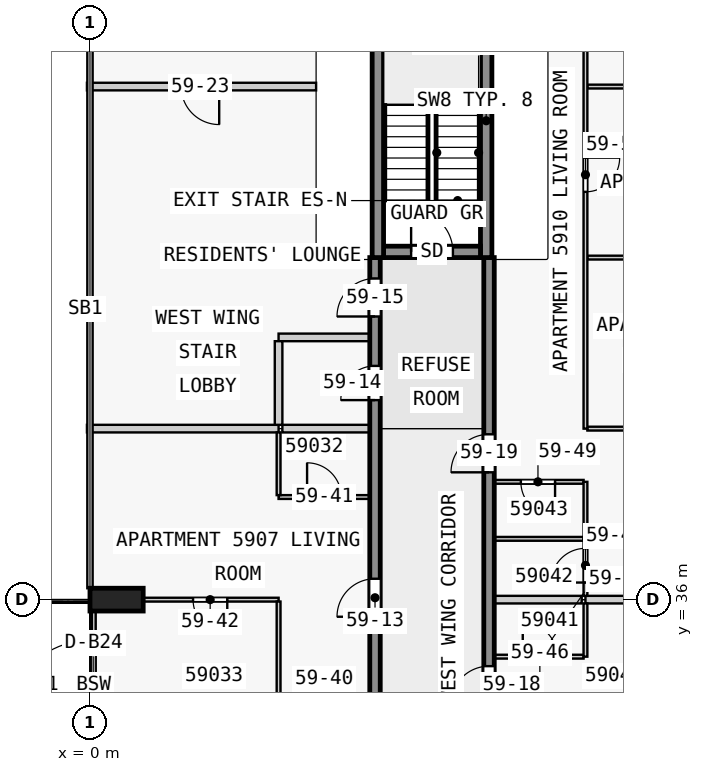
"""IFC4 building model, lengths in metres.
Left out: names, types, materials, properties, quantities, classifications, styles, units other than length and angle.
Written with IfcOpenShell. Run it as: python <this file> out.ifc"""

import sys

from ifc_helpers import new_model, si_unit, direction, frame, frame_2d, origin, origin_2d, place, context, subcontext, project, spatial, rectangle, extrude, element, fill, save


model = new_model("IFC4")
c1 = context("Model", 3, precision=1e-05, world=origin(), true_north=direction((0.0, 1.0)))
c2 = subcontext(c1, "Body", "Model", "MODEL_VIEW")
j1 = project(units=[si_unit("LENGTHUNIT", "METRE"), si_unit("PLANEANGLEUNIT", "RADIAN")], contexts=[c1])
p1 = place(None, origin())
s1 = spatial("IfcSite", under=j1, at=p1, CompositionType="ELEMENT")
p2 = place(p1, origin())
s2 = spatial("IfcBuilding", under=s1, at=p2, CompositionType="ELEMENT")
p3 = place(p2, frame((0.0, 0.0, 225.9)))
s3 = spatial("IfcBuildingStorey", under=s2, at=p3, CompositionType="ELEMENT", Elevation=225.9)
p4 = place(p3, frame((0.7, 36.0, 0.0), z_axis=(0.0, 0.0, 1.0), x_axis=(0.0, 1.0, 0.0)))
e1 = element("IfcColumn", 1, at=p4, inside=s3, PredefinedType="COLUMN", context=c2, shape_type="SweptSolid", body=[
    extrude(rectangle(XDim=0.6, YDim=1.4, at=origin_2d()), origin(), (0.0, 0.0, 1.0), 3.5),
])
p5 = place(p3, frame((7.725, 45.15, 0.0), z_axis=(0.0, 0.0, 1.0), x_axis=(1.0, 0.0, 0.0)))
e2 = element("IfcWall", 2, at=p5, inside=s3, PredefinedType="SHEAR", context=c2, shape_type="SweptSolid", body=[
    extrude(rectangle(XDim=2.55, YDim=0.3, at=frame_2d((1.275, 0.0))), origin(), (0.0, 0.0, 1.0), 3.5),
])
p6 = place(p5, frame((0.725, 0.0, 0.0)))
e3 = element("IfcOpeningElement", 3, at=p6, cuts=e2, PredefinedType="OPENING", context=c2, shape_type="SweptSolid", body=[
    extrude(rectangle(XDim=1.1, YDim=2.1, at=frame_2d((0.55, 1.05))), frame((0.0, 0.16, 0.0), z_axis=(0.0, -1.0, 0.0), x_axis=(1.0, 0.0, 0.0)), (0.0, 0.0, 1.0), 0.32),
])
for number, where, z_axis, x_axis in (
    (4, (7.575, 45.0, 0.0), (0.0, 0.0, 1.0), (0.0, 1.0, 0.0)),
    (5, (10.425, 45.0, 0.0), (0.0, 0.0, 1.0), (0.0, 1.0, 0.0)),
):
    element("IfcWall", number, at=place(p3, frame(where, z_axis=z_axis, x_axis=x_axis)), inside=s3, PredefinedType="SHEAR", context=c2, shape_type="SweptSolid", body=[
        extrude(rectangle(XDim=7.2, YDim=0.3, at=frame_2d((3.6, 0.0))), origin(), (0.0, 0.0, 1.0), 3.5),
    ])
p7 = place(p3, frame((7.5, 18.0, 0.0), z_axis=(0.0, 0.0, 1.0), x_axis=(0.0, 1.0, 0.0)))
e6 = element("IfcWall", 6, at=p7, inside=s3, PredefinedType="SHEAR", context=c2, shape_type="SweptSolid", body=[
    extrude(rectangle(XDim=27.0, YDim=0.275, at=frame_2d((13.5, 0.0))), origin(), (0.0, 0.0, 1.0), 3.05),
])
p8 = place(p7, frame((1.75, 0.0, 0.0)))
e7 = element("IfcOpeningElement", 7, at=p8, cuts=e6, PredefinedType="OPENING", context=c2, shape_type="SweptSolid", body=[
    extrude(rectangle(XDim=1.0, YDim=2.1, at=frame_2d((0.5, 1.05))), frame((0.0, 0.147, 0.0), z_axis=(0.0, -1.0, 0.0), x_axis=(1.0, 0.0, 0.0)), (0.0, 0.0, 1.0), 0.295),
])
p9 = place(p7, frame((8.55, 0.0, 0.0)))
e8 = element("IfcOpeningElement", 8, at=p9, cuts=e6, PredefinedType="OPENING", context=c2, shape_type="SweptSolid", body=[
    extrude(rectangle(XDim=1.0, YDim=2.1, at=frame_2d((0.5, 1.05))), frame((0.0, 0.147, 0.0), z_axis=(0.0, -1.0, 0.0), x_axis=(1.0, 0.0, 0.0)), (0.0, 0.0, 1.0), 0.295),
])
p10 = place(p7, frame((17.55, 0.0, 0.0)))
e9 = element("IfcOpeningElement", 9, at=p10, cuts=e6, PredefinedType="OPENING", context=c2, shape_type="SweptSolid", body=[
    extrude(rectangle(XDim=1.0, YDim=2.1, at=frame_2d((0.5, 1.05))), frame((0.0, 0.147, 0.0), z_axis=(0.0, -1.0, 0.0), x_axis=(1.0, 0.0, 0.0)), (0.0, 0.0, 1.0), 0.295),
])
p11 = place(p7, frame((23.25, 0.0, 0.0)))
e10 = element("IfcOpeningElement", 10, at=p11, cuts=e6, PredefinedType="OPENING", context=c2, shape_type="SweptSolid", body=[
    extrude(rectangle(XDim=0.9, YDim=2.1, at=frame_2d((0.45, 1.05))), frame((0.0, 0.147, 0.0), z_axis=(0.0, -1.0, 0.0), x_axis=(1.0, 0.0, 0.0)), (0.0, 0.0, 1.0), 0.295),
])
p12 = place(p7, frame((25.45, 0.0, 0.0)))
e11 = element("IfcOpeningElement", 11, at=p12, cuts=e6, PredefinedType="OPENING", context=c2, shape_type="SweptSolid", body=[
    extrude(rectangle(XDim=1.0, YDim=2.1, at=frame_2d((0.5, 1.05))), frame((0.0, 0.147, 0.0), z_axis=(0.0, -1.0, 0.0), x_axis=(1.0, 0.0, 0.0)), (0.0, 0.0, 1.0), 0.295),
])
p13 = place(p3, frame((10.5, 18.0, 0.0), z_axis=(0.0, 0.0, 1.0), x_axis=(0.0, 1.0, 0.0)))
e12 = element("IfcWall", 12, at=p13, inside=s3, PredefinedType="SHEAR", context=c2, shape_type="SweptSolid", body=[
    extrude(rectangle(XDim=27.0, YDim=0.275, at=frame_2d((13.5, 0.0))), origin(), (0.0, 0.0, 1.0), 3.05),
])
p14 = place(p13, frame((4.05, 0.0, 0.0)))
e13 = element("IfcOpeningElement", 13, at=p14, cuts=e12, PredefinedType="OPENING", context=c2, shape_type="SweptSolid", body=[
    extrude(rectangle(XDim=1.0, YDim=2.1, at=frame_2d((0.5, 1.05))), frame((0.0, 0.147, 0.0), z_axis=(0.0, -1.0, 0.0), x_axis=(1.0, 0.0, 0.0)), (0.0, 0.0, 1.0), 0.295),
])
p15 = place(p13, frame((10.35, 0.0, 0.0)))
e14 = element("IfcOpeningElement", 14, at=p15, cuts=e12, PredefinedType="OPENING", context=c2, shape_type="SweptSolid", body=[
    extrude(rectangle(XDim=1.8, YDim=2.1, at=frame_2d((0.9, 1.05))), frame((0.0, 0.147, 0.0), z_axis=(0.0, -1.0, 0.0), x_axis=(1.0, 0.0, 0.0)), (0.0, 0.0, 1.0), 0.295),
])
p16 = place(p13, frame((15.25, 0.0, 0.0)))
e15 = element("IfcOpeningElement", 15, at=p16, cuts=e12, PredefinedType="OPENING", context=c2, shape_type="SweptSolid", body=[
    extrude(rectangle(XDim=1.0, YDim=2.1, at=frame_2d((0.5, 1.05))), frame((0.0, 0.147, 0.0), z_axis=(0.0, -1.0, 0.0), x_axis=(1.0, 0.0, 0.0)), (0.0, 0.0, 1.0), 0.295),
])
p17 = place(p13, frame((21.35, 0.0, 0.0)))
e16 = element("IfcOpeningElement", 16, at=p17, cuts=e12, PredefinedType="OPENING", context=c2, shape_type="SweptSolid", body=[
    extrude(rectangle(XDim=1.0, YDim=2.1, at=frame_2d((0.5, 1.05))), frame((0.0, 0.147, 0.0), z_axis=(0.0, -1.0, 0.0), x_axis=(1.0, 0.0, 0.0)), (0.0, 0.0, 1.0), 0.295),
])
p18 = place(p3, frame((0.1, 31.5, 0.0), z_axis=(0.0, 0.0, 1.0), x_axis=(0.0, 1.0, 0.0)))
e17 = element("IfcWall", 17, at=p18, inside=s3, PredefinedType="STANDARD", context=c2, shape_type="SweptSolid", body=[
    extrude(rectangle(XDim=4.5, YDim=0.1, at=frame_2d((2.25, 0.0))), origin(), (0.0, 0.0, 1.0), 3.05),
])
p19 = place(p18, frame((1.05, 0.0, 0.0)))
e18 = element("IfcOpeningElement", 18, at=p19, cuts=e17, PredefinedType="OPENING", context=c2, shape_type="SweptSolid", body=[
    extrude(rectangle(XDim=2.4, YDim=2.4, at=frame_2d((1.2, 1.2))), frame((0.0, 0.06, 0.0), z_axis=(0.0, -1.0, 0.0), x_axis=(1.0, 0.0, 0.0)), (0.0, 0.0, 1.0), 0.12),
])
p20 = place(p3, frame((10.637, 34.5, 0.0), z_axis=(0.0, 0.0, 1.0), x_axis=(1.0, 0.0, 0.0)))
e19 = element("IfcWall", 19, at=p20, inside=s3, PredefinedType="PARTITIONING", context=c2, shape_type="SweptSolid", body=[
    extrude(rectangle(XDim=2.35, YDim=0.1, at=frame_2d((1.175, 0.0))), origin(), (0.0, 0.0, 1.0), 3.05),
])
p21 = place(p20, frame((0.75, 0.0, 0.0)))
e20 = element("IfcOpeningElement", 20, at=p21, cuts=e19, PredefinedType="OPENING", context=c2, shape_type="SweptSolid", body=[
    extrude(rectangle(XDim=0.9, YDim=2.1, at=frame_2d((0.45, 1.05))), frame((0.0, 0.06, 0.0), z_axis=(0.0, -1.0, 0.0), x_axis=(1.0, 0.0, 0.0)), (0.0, 0.0, 1.0), 0.12),
])
p22 = place(p3, frame((4.962, 36.0, 0.0), z_axis=(0.0, 0.0, 1.0), x_axis=(-1.0, 0.0, 0.0)))
e21 = element("IfcWall", 21, at=p22, inside=s3, PredefinedType="PARTITIONING", context=c2, shape_type="SweptSolid", body=[
    extrude(rectangle(XDim=3.562, YDim=0.1, at=frame_2d((1.781, 0.0))), origin(), (0.0, 0.0, 1.0), 3.05),
])
p23 = place(p22, frame((1.35, 0.0, 0.0)))
e22 = element("IfcOpeningElement", 22, at=p23, cuts=e21, PredefinedType="OPENING", context=c2, shape_type="SweptSolid", body=[
    extrude(rectangle(XDim=0.9, YDim=2.1, at=frame_2d((0.45, 1.05))), frame((0.0, 0.06, 0.0), z_axis=(0.0, -1.0, 0.0), x_axis=(1.0, 0.0, 0.0)), (0.0, 0.0, 1.0), 0.12),
])
p24 = place(p3, frame((12.938, 36.0, 0.0), z_axis=(0.0, 0.0, 1.0), x_axis=(-1.0, 0.0, 0.0)))
e23 = element("IfcWall", 23, at=p24, inside=s3, PredefinedType="PARTITIONING", context=c2, shape_type="SweptSolid", body=[
    extrude(rectangle(XDim=2.3, YDim=0.2, at=frame_2d((1.15, 0.0))), origin(), (0.0, 0.0, 1.0), 3.05),
])
p25 = place(p3, frame((13.038, 36.0, 0.0), z_axis=(0.0, 0.0, 1.0), x_axis=(1.0, 0.0, 0.0)))
e24 = element("IfcWall", 24, at=p25, inside=s3, PredefinedType="PARTITIONING", context=c2, shape_type="SweptSolid", body=[
    extrude(rectangle(XDim=3.562, YDim=0.2, at=frame_2d((1.781, 0.0))), origin(), (0.0, 0.0, 1.0), 3.05),
])
p26 = place(p3, frame((12.988, 37.6, 0.0), z_axis=(0.0, 0.0, 1.0), x_axis=(-1.0, 0.0, 0.0)))
e25 = element("IfcWall", 25, at=p26, inside=s3, PredefinedType="PARTITIONING", context=c2, shape_type="SweptSolid", body=[
    extrude(rectangle(XDim=2.35, YDim=0.1, at=frame_2d((1.175, 0.0))), origin(), (0.0, 0.0, 1.0), 3.05),
])
p27 = place(p3, frame((4.962, 38.7, 0.0), z_axis=(0.0, 0.0, 1.0), x_axis=(1.0, 0.0, 0.0)))
e26 = element("IfcWall", 26, at=p27, inside=s3, PredefinedType="PARTITIONING", context=c2, shape_type="SweptSolid", body=[
    extrude(rectangle(XDim=2.4, YDim=0.1, at=frame_2d((1.2, 0.0))), origin(), (0.0, 0.0, 1.0), 3.05),
])
p28 = place(p27, frame((0.75, 0.0, 0.0)))
e27 = element("IfcOpeningElement", 27, at=p28, cuts=e26, PredefinedType="OPENING", context=c2, shape_type="SweptSolid", body=[
    extrude(rectangle(XDim=0.9, YDim=2.1, at=frame_2d((0.45, 1.05))), frame((0.0, 0.06, 0.0), z_axis=(0.0, -1.0, 0.0), x_axis=(1.0, 0.0, 0.0)), (0.0, 0.0, 1.0), 0.12),
])
p29 = place(p3, frame((12.988, 39.1, 0.0), z_axis=(0.0, 0.0, 1.0), x_axis=(-1.0, 0.0, 0.0)))
e28 = element("IfcWall", 28, at=p29, inside=s3, PredefinedType="PARTITIONING", context=c2, shape_type="SweptSolid", body=[
    extrude(rectangle(XDim=2.35, YDim=0.1, at=frame_2d((1.175, 0.0))), origin(), (0.0, 0.0, 1.0), 3.05),
])
p30 = place(p29, frame((0.75, 0.0, 0.0)))
e29 = element("IfcOpeningElement", 29, at=p30, cuts=e28, PredefinedType="OPENING", context=c2, shape_type="SweptSolid", body=[
    extrude(rectangle(XDim=0.9, YDim=2.1, at=frame_2d((0.45, 1.05))), frame((0.0, 0.06, 0.0), z_axis=(0.0, -1.0, 0.0), x_axis=(1.0, 0.0, 0.0)), (0.0, 0.0, 1.0), 0.12),
])
p31 = place(p3, frame((13.087, 40.5, 0.0), z_axis=(0.0, 0.0, 1.0), x_axis=(1.0, 0.0, 0.0)))
e30 = element("IfcWall", 30, at=p31, inside=s3, PredefinedType="PARTITIONING", context=c2, shape_type="SweptSolid", body=[
    extrude(rectangle(XDim=4.763, YDim=0.1, at=frame_2d((2.381, 0.0))), origin(), (0.0, 0.0, 1.0), 3.05),
])
p32 = place(p31, frame((1.95, 0.0, 0.0)))
e31 = element("IfcOpeningElement", 31, at=p32, cuts=e30, PredefinedType="OPENING", context=c2, shape_type="SweptSolid", body=[
    extrude(rectangle(XDim=0.9, YDim=2.1, at=frame_2d((0.45, 1.05))), frame((0.0, 0.06, 0.0), z_axis=(0.0, -1.0, 0.0), x_axis=(1.0, 0.0, 0.0)), (0.0, 0.0, 1.0), 0.12),
])
p33 = place(p3, frame((7.363, 40.5, 0.0), z_axis=(0.0, 0.0, 1.0), x_axis=(-1.0, 0.0, 0.0)))
e32 = element("IfcWall", 32, at=p33, inside=s3, PredefinedType="PARTITIONING", context=c2, shape_type="SweptSolid", body=[
    extrude(rectangle(XDim=2.3, YDim=0.2, at=frame_2d((1.15, 0.0))), origin(), (0.0, 0.0, 1.0), 3.05),
])
p34 = place(p3, frame((-0.08, 40.5, 0.0), z_axis=(0.0, 0.0, 1.0), x_axis=(1.0, 0.0, 0.0)))
e33 = element("IfcWall", 33, at=p34, inside=s3, PredefinedType="PARTITIONING", context=c2, shape_type="SweptSolid", body=[
    extrude(rectangle(XDim=5.042, YDim=0.2, at=frame_2d((2.521, 0.0))), origin(), (0.0, 0.0, 1.0), 3.05),
])
p35 = place(p3, frame((7.363, 42.9, 0.0), z_axis=(0.0, 0.0, 1.0), x_axis=(-1.0, 0.0, 0.0)))
e34 = element("IfcWall", 34, at=p35, inside=s3, PredefinedType="PARTITIONING", context=c2, shape_type="SweptSolid", body=[
    extrude(rectangle(XDim=2.4, YDim=0.2, at=frame_2d((1.2, 0.0))), origin(), (0.0, 0.0, 1.0), 3.05),
])
p36 = place(p3, frame((17.85, 45.0, 0.0), z_axis=(0.0, 0.0, 1.0), x_axis=(-1.0, 0.0, 0.0)))
e35 = element("IfcWall", 35, at=p36, inside=s3, PredefinedType="PARTITIONING", context=c2, shape_type="SweptSolid", body=[
    extrude(rectangle(XDim=4.763, YDim=0.1, at=frame_2d((2.381, 0.0))), origin(), (0.0, 0.0, 1.0), 3.05),
])
p37 = place(p3, frame((18.08, 49.5, 0.0), z_axis=(0.0, 0.0, 1.0), x_axis=(-1.0, 0.0, 0.0)))
e36 = element("IfcWall", 36, at=p37, inside=s3, PredefinedType="PARTITIONING", context=c2, shape_type="SweptSolid", body=[
    extrude(rectangle(XDim=4.993, YDim=0.1, at=frame_2d((2.496, 0.0))), origin(), (0.0, 0.0, 1.0), 3.05),
])
p38 = place(p3, frame((5.95, 49.5, 0.0), z_axis=(0.0, 0.0, 1.0), x_axis=(-1.0, 0.0, 0.0)))
e37 = element("IfcWall", 37, at=p38, inside=s3, PredefinedType="PARTITIONING", context=c2, shape_type="SweptSolid", body=[
    extrude(rectangle(XDim=6.03, YDim=0.2, at=frame_2d((3.015, 0.0))), origin(), (0.0, 0.0, 1.0), 3.05),
])
p39 = place(p38, frame((2.55, 0.0, 0.0)))
e38 = element("IfcOpeningElement", 38, at=p39, cuts=e37, PredefinedType="OPENING", context=c2, shape_type="SweptSolid", body=[
    extrude(rectangle(XDim=1.0, YDim=2.1, at=frame_2d((0.5, 1.05))), frame((0.0, 0.11, 0.0), z_axis=(0.0, -1.0, 0.0), x_axis=(1.0, 0.0, 0.0)), (0.0, 0.0, 1.0), 0.22),
])
p40 = place(p3, frame((4.962, 40.4, 0.0), z_axis=(0.0, 0.0, 1.0), x_axis=(0.0, -1.0, 0.0)))
e39 = element("IfcWall", 39, at=p40, inside=s3, PredefinedType="PARTITIONING", context=c2, shape_type="SweptSolid", body=[
    extrude(rectangle(XDim=1.65, YDim=0.1, at=frame_2d((0.825, 0.0))), origin(), (0.0, 0.0, 1.0), 3.05),
])
p41 = place(p3, frame((4.962, 33.35, 0.0), z_axis=(0.0, 0.0, 1.0), x_axis=(0.0, 1.0, 0.0)))
e40 = element("IfcWall", 40, at=p41, inside=s3, PredefinedType="PARTITIONING", context=c2, shape_type="SweptSolid", body=[
    extrude(rectangle(XDim=2.6, YDim=0.1, at=frame_2d((1.3, 0.0))), origin(), (0.0, 0.0, 1.0), 3.05),
])
p42 = place(p3, frame((4.962, 42.8, 0.0), z_axis=(0.0, 0.0, 1.0), x_axis=(0.0, -1.0, 0.0)))
e41 = element("IfcWall", 41, at=p42, inside=s3, PredefinedType="PARTITIONING", context=c2, shape_type="SweptSolid", body=[
    extrude(rectangle(XDim=2.2, YDim=0.2, at=frame_2d((1.1, 0.0))), origin(), (0.0, 0.0, 1.0), 3.05),
])
p43 = place(p3, frame((13.038, 54.08, 0.0), z_axis=(0.0, 0.0, 1.0), x_axis=(0.0, -1.0, 0.0)))
e42 = element("IfcWall", 42, at=p43, inside=s3, PredefinedType="PARTITIONING", context=c2, shape_type="SweptSolid", body=[
    extrude(rectangle(XDim=13.58, YDim=0.1, at=frame_2d((6.79, 0.0))), origin(), (0.0, 0.0, 1.0), 3.05),
])
p44 = place(p43, frame((6.45, 0.0, 0.0)))
e43 = element("IfcOpeningElement", 43, at=p44, cuts=e42, PredefinedType="OPENING", context=c2, shape_type="SweptSolid", body=[
    extrude(rectangle(XDim=0.9, YDim=2.1, at=frame_2d((0.45, 1.05))), frame((0.0, 0.06, 0.0), z_axis=(0.0, -1.0, 0.0), x_axis=(1.0, 0.0, 0.0)), (0.0, 0.0, 1.0), 0.12),
])
p45 = place(p43, frame((1.95, 0.0, 0.0)))
e44 = element("IfcOpeningElement", 44, at=p45, cuts=e42, PredefinedType="OPENING", context=c2, shape_type="SweptSolid", body=[
    extrude(rectangle(XDim=0.9, YDim=2.1, at=frame_2d((0.45, 1.05))), frame((0.0, 0.06, 0.0), z_axis=(0.0, -1.0, 0.0), x_axis=(1.0, 0.0, 0.0)), (0.0, 0.0, 1.0), 0.12),
])
p46 = place(p3, frame((13.038, 34.5, 0.0), z_axis=(0.0, 0.0, 1.0), x_axis=(0.0, 1.0, 0.0)))
e45 = element("IfcWall", 45, at=p46, inside=s3, PredefinedType="PARTITIONING", context=c2, shape_type="SweptSolid", body=[
    extrude(rectangle(XDim=1.4, YDim=0.1, at=frame_2d((0.7, 0.0))), origin(), (0.0, 0.0, 1.0), 3.05),
])
p47 = place(p3, frame((13.038, 36.1, 0.0), z_axis=(0.0, 0.0, 1.0), x_axis=(0.0, 1.0, 0.0)))
e46 = element("IfcWall", 46, at=p47, inside=s3, PredefinedType="PARTITIONING", context=c2, shape_type="SweptSolid", body=[
    extrude(rectangle(XDim=3.0, YDim=0.1, at=frame_2d((1.5, 0.0))), origin(), (0.0, 0.0, 1.0), 3.05),
])
p48 = place(p47, frame((0.35, 0.0, 0.0)))
e47 = element("IfcOpeningElement", 47, at=p48, cuts=e46, PredefinedType="OPENING", context=c2, shape_type="SweptSolid", body=[
    extrude(rectangle(XDim=0.9, YDim=2.1, at=frame_2d((0.45, 1.05))), frame((0.0, 0.06, 0.0), z_axis=(0.0, -1.0, 0.0), x_axis=(1.0, 0.0, 0.0)), (0.0, 0.0, 1.0), 0.12),
])
p49 = place(p19, origin())
e48 = element("IfcDoor", 48, at=p49, inside=s3, OperationType="SINGLE_SWING_LEFT", PredefinedType="DOOR", context=c2, shape_type="SweptSolid", body=[
    extrude(rectangle(XDim=2.4, YDim=2.4, at=frame_2d((1.2, 1.2))), frame((0.0, 0.025, 0.0), z_axis=(0.0, -1.0, 0.0), x_axis=(1.0, 0.0, 0.0)), (0.0, 0.0, 1.0), 0.05),
])
fill(e18, e48)
p50 = place(p6, origin())
e49 = element("IfcDoor", 49, at=p50, inside=s3, OperationType="SINGLE_SWING_LEFT", PredefinedType="DOOR", context=c2, shape_type="SweptSolid", body=[
    extrude(rectangle(XDim=1.1, YDim=2.1, at=frame_2d((0.55, 1.05))), frame((0.0, 0.025, 0.0), z_axis=(0.0, -1.0, 0.0), x_axis=(1.0, 0.0, 0.0)), (0.0, 0.0, 1.0), 0.05),
])
fill(e3, e49)
p51 = place(p10, origin())
e50 = element("IfcDoor", 50, at=p51, inside=s3, OperationType="SINGLE_SWING_RIGHT", PredefinedType="DOOR", context=c2, shape_type="SweptSolid", body=[
    extrude(rectangle(XDim=1.0, YDim=2.1, at=frame_2d((0.5, 1.05))), frame((0.0, 0.025, 0.0), z_axis=(0.0, -1.0, 0.0), x_axis=(1.0, 0.0, 0.0)), (0.0, 0.0, 1.0), 0.05),
])
fill(e9, e50)
p52 = place(p11, origin())
e51 = element("IfcDoor", 51, at=p52, inside=s3, OperationType="SINGLE_SWING_RIGHT", PredefinedType="DOOR", context=c2, shape_type="SweptSolid", body=[
    extrude(rectangle(XDim=0.9, YDim=2.1, at=frame_2d((0.45, 1.05))), frame((0.0, 0.025, 0.0), z_axis=(0.0, -1.0, 0.0), x_axis=(1.0, 0.0, 0.0)), (0.0, 0.0, 1.0), 0.05),
])
fill(e10, e51)
p53 = place(p12, origin())
e52 = element("IfcDoor", 52, at=p53, inside=s3, OperationType="SINGLE_SWING_RIGHT", PredefinedType="DOOR", context=c2, shape_type="SweptSolid", body=[
    extrude(rectangle(XDim=1.0, YDim=2.1, at=frame_2d((0.5, 1.05))), frame((0.0, 0.025, 0.0), z_axis=(0.0, -1.0, 0.0), x_axis=(1.0, 0.0, 0.0)), (0.0, 0.0, 1.0), 0.05),
])
fill(e11, e52)
p54 = place(p16, origin())
e53 = element("IfcDoor", 53, at=p54, inside=s3, OperationType="SINGLE_SWING_RIGHT", PredefinedType="DOOR", context=c2, shape_type="SweptSolid", body=[
    extrude(rectangle(XDim=1.0, YDim=2.1, at=frame_2d((0.5, 1.05))), frame((0.0, 0.025, 0.0), z_axis=(0.0, -1.0, 0.0), x_axis=(1.0, 0.0, 0.0)), (0.0, 0.0, 1.0), 0.05),
])
fill(e15, e53)
p55 = place(p17, origin())
e54 = element("IfcDoor", 54, at=p55, inside=s3, OperationType="SINGLE_SWING_RIGHT", PredefinedType="DOOR", context=c2, shape_type="SweptSolid", body=[
    extrude(rectangle(XDim=1.0, YDim=2.1, at=frame_2d((0.5, 1.05))), frame((0.0, 0.025, 0.0), z_axis=(0.0, -1.0, 0.0), x_axis=(1.0, 0.0, 0.0)), (0.0, 0.0, 1.0), 0.05),
])
fill(e16, e54)
p56 = place(p39, origin())
e55 = element("IfcDoor", 55, at=p56, inside=s3, OperationType="SINGLE_SWING_RIGHT", PredefinedType="DOOR", context=c2, shape_type="SweptSolid", body=[
    extrude(rectangle(XDim=1.0, YDim=2.1, at=frame_2d((0.5, 1.05))), frame((0.0, 0.025, 0.0), z_axis=(0.0, -1.0, 0.0), x_axis=(1.0, 0.0, 0.0)), (0.0, 0.0, 1.0), 0.05),
])
fill(e38, e55)
p57 = place(p28, origin())
e56 = element("IfcDoor", 56, at=p57, inside=s3, OperationType="SINGLE_SWING_RIGHT", PredefinedType="DOOR", context=c2, shape_type="SweptSolid", body=[
    extrude(rectangle(XDim=0.9, YDim=2.1, at=frame_2d((0.45, 1.05))), frame((0.0, 0.025, 0.0), z_axis=(0.0, -1.0, 0.0), x_axis=(1.0, 0.0, 0.0)), (0.0, 0.0, 1.0), 0.05),
])
fill(e27, e56)
p58 = place(p23, origin())
e57 = element("IfcDoor", 57, at=p58, inside=s3, OperationType="SINGLE_SWING_RIGHT", PredefinedType="DOOR", context=c2, shape_type="SweptSolid", body=[
    extrude(rectangle(XDim=0.9, YDim=2.1, at=frame_2d((0.45, 1.05))), frame((0.0, 0.025, 0.0), z_axis=(0.0, -1.0, 0.0), x_axis=(1.0, 0.0, 0.0)), (0.0, 0.0, 1.0), 0.05),
])
fill(e22, e57)
p59 = place(p21, origin())
e58 = element("IfcDoor", 58, at=p59, inside=s3, OperationType="SINGLE_SWING_RIGHT", PredefinedType="DOOR", context=c2, shape_type="SweptSolid", body=[
    extrude(rectangle(XDim=0.9, YDim=2.1, at=frame_2d((0.45, 1.05))), frame((0.0, 0.025, 0.0), z_axis=(0.0, -1.0, 0.0), x_axis=(1.0, 0.0, 0.0)), (0.0, 0.0, 1.0), 0.05),
])
fill(e20, e58)
p60 = place(p48, origin())
e59 = element("IfcDoor", 59, at=p60, inside=s3, OperationType="SINGLE_SWING_LEFT", PredefinedType="DOOR", context=c2, shape_type="SweptSolid", body=[
    extrude(rectangle(XDim=0.9, YDim=2.1, at=frame_2d((0.45, 1.05))), frame((0.0, 0.025, 0.0), z_axis=(0.0, -1.0, 0.0), x_axis=(1.0, 0.0, 0.0)), (0.0, 0.0, 1.0), 0.05),
])
fill(e47, e59)
p61 = place(p30, origin())
e60 = element("IfcDoor", 60, at=p61, inside=s3, OperationType="SINGLE_SWING_RIGHT", PredefinedType="DOOR", context=c2, shape_type="SweptSolid", body=[
    extrude(rectangle(XDim=0.9, YDim=2.1, at=frame_2d((0.45, 1.05))), frame((0.0, 0.025, 0.0), z_axis=(0.0, -1.0, 0.0), x_axis=(1.0, 0.0, 0.0)), (0.0, 0.0, 1.0), 0.05),
])
fill(e29, e60)
p62 = place(p44, origin())
e61 = element("IfcDoor", 61, at=p62, inside=s3, OperationType="SINGLE_SWING_RIGHT", PredefinedType="DOOR", context=c2, shape_type="SweptSolid", body=[
    extrude(rectangle(XDim=0.9, YDim=2.1, at=frame_2d((0.45, 1.05))), frame((0.0, 0.025, 0.0), z_axis=(0.0, -1.0, 0.0), x_axis=(1.0, 0.0, 0.0)), (0.0, 0.0, 1.0), 0.05),
])
fill(e43, e61)
save(model, sys.argv[1])
